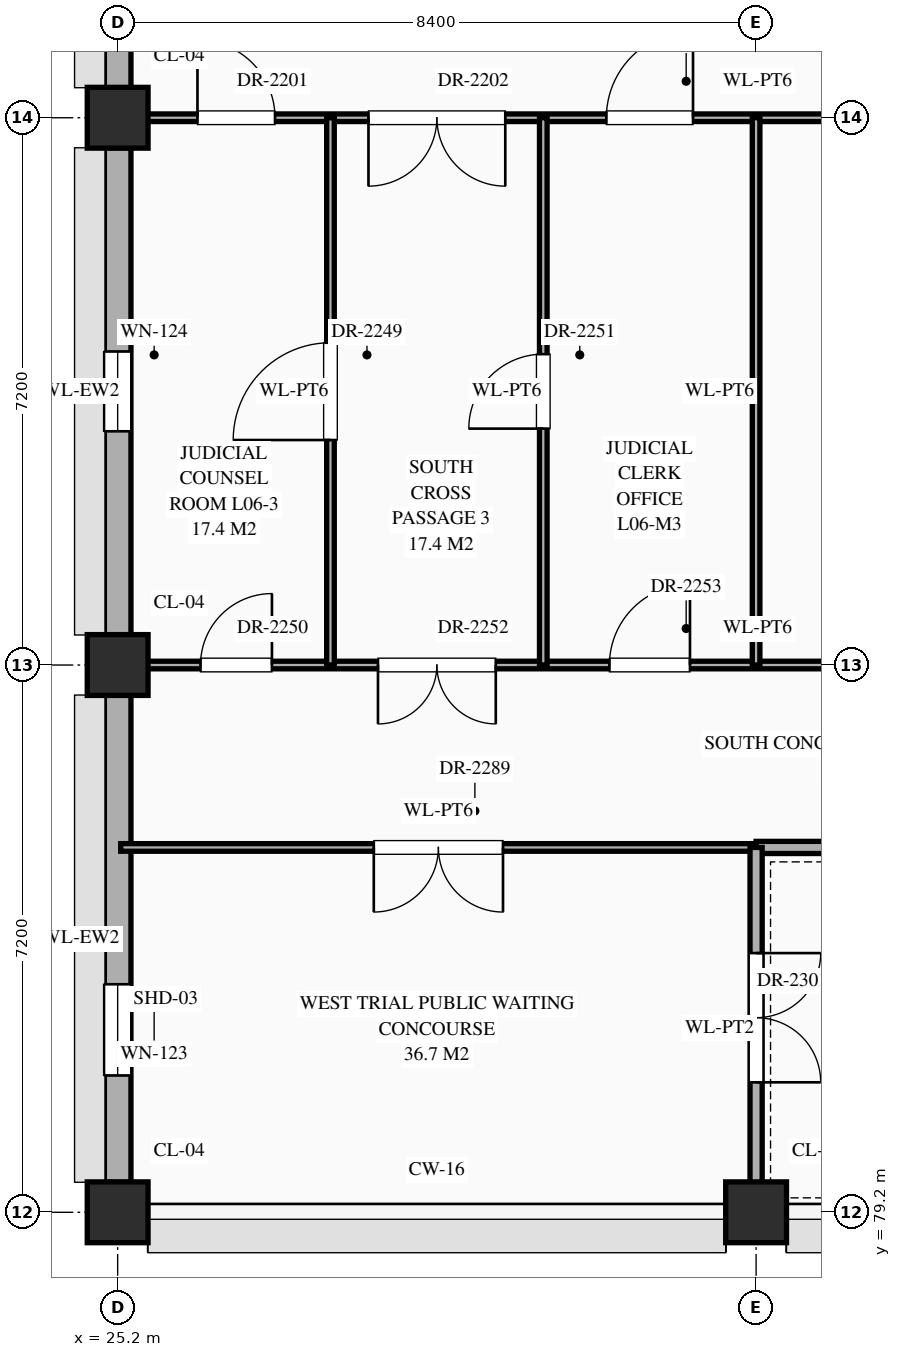
"""IFC4 building model, lengths in metres.
Left out: names, types, materials, properties, quantities, classifications, styles, units other than length and angle.
Written with IfcOpenShell. Run it as: python <this file> out.ifc"""

import sys

from ifc_helpers import new_model, si_unit, direction, frame, frame_2d, origin, origin_2d, place, context, subcontext, project, spatial, rectangle, extrude, element, fill, save


model = new_model("IFC4")
c1 = context("Model", 3, precision=1e-05, world=origin(), true_north=direction((0.0, 1.0)))
c2 = subcontext(c1, "Body", "Model", "MODEL_VIEW")
j1 = project(units=[si_unit("LENGTHUNIT", "METRE"), si_unit("PLANEANGLEUNIT", "RADIAN")], contexts=[c1])
p1 = place(None, origin())
s1 = spatial("IfcSite", under=j1, at=p1, CompositionType="ELEMENT")
p2 = place(p1, origin())
s2 = spatial("IfcBuilding", under=s1, at=p2, CompositionType="ELEMENT")
p3 = place(p2, frame((0.0, 0.0, 26.1)))
s3 = spatial("IfcBuildingStorey", under=s2, at=p3, CompositionType="ELEMENT", Elevation=26.1)
for number, where, z_axis, x_axis in (
    (1, (25.2, 79.2, 0.0), (0.0, 0.0, 1.0), (1.0, 0.0, 0.0)),
    (2, (25.2, 86.4, 0.0), (0.0, 0.0, 1.0), (1.0, 0.0, 0.0)),
    (3, (25.2, 93.6, 0.0), (0.0, 0.0, 1.0), (1.0, 0.0, 0.0)),
    (4, (33.6, 79.2, 0.0), (0.0, 0.0, 1.0), (1.0, 0.0, 0.0)),
):
    element("IfcColumn", number, at=place(p3, frame(where, z_axis=z_axis, x_axis=x_axis)), inside=s3, PredefinedType="COLUMN", context=c2, shape_type="SweptSolid", body=[
        extrude(rectangle(XDim=0.8, YDim=0.8, at=origin_2d()), origin(), (0.0, 0.0, 1.0), 4.5),
    ])
p4 = place(p3, frame((25.2, 79.595, 0.0), z_axis=(0.0, 0.0, 1.0), x_axis=(0.0, 1.0, 0.0)))
e5 = element("IfcWall", 5, at=p4, inside=s3, PredefinedType="STANDARD", context=c2, shape_type="SweptSolid", body=[
    extrude(rectangle(XDim=6.41, YDim=0.35, at=frame_2d((3.205, 0.0))), origin(), (0.0, 0.0, 1.0), 3.59),
])
p5 = place(p4, frame((1.405, 0.0, 0.85)))
e6 = element("IfcOpeningElement", 6, at=p5, cuts=e5, PredefinedType="OPENING", context=c2, shape_type="SweptSolid", body=[
    extrude(rectangle(XDim=1.2, YDim=1.2, at=frame_2d((0.6, 0.6))), frame((0.0, 0.187, 0.0), z_axis=(0.0, -1.0, 0.0), x_axis=(1.0, 0.0, 0.0)), (0.0, 0.0, 1.0), 0.374),
])
p6 = place(p3, frame((25.2, 86.795, 0.0), z_axis=(0.0, 0.0, 1.0), x_axis=(0.0, 1.0, 0.0)))
e7 = element("IfcWall", 7, at=p6, inside=s3, PredefinedType="STANDARD", context=c2, shape_type="SweptSolid", body=[
    extrude(rectangle(XDim=6.41, YDim=0.35, at=frame_2d((3.205, 0.0))), origin(), (0.0, 0.0, 1.0), 3.59),
])
p7 = place(p6, frame((2.68, 0.0, 0.85)))
e8 = element("IfcOpeningElement", 8, at=p7, cuts=e7, PredefinedType="OPENING", context=c2, shape_type="SweptSolid", body=[
    extrude(rectangle(XDim=1.05, YDim=1.38, at=frame_2d((0.525, 0.69))), frame((0.0, 0.187, 0.0), z_axis=(0.0, -1.0, 0.0), x_axis=(1.0, 0.0, 0.0)), (0.0, 0.0, 1.0), 0.374),
])
p8 = place(p3, frame((25.2, 93.995, 0.0), z_axis=(0.0, 0.0, 1.0), x_axis=(0.0, 1.0, 0.0)))
e9 = element("IfcWall", 9, at=p8, inside=s3, PredefinedType="STANDARD", context=c2, shape_type="SweptSolid", body=[
    extrude(rectangle(XDim=6.41, YDim=0.35, at=frame_2d((3.205, 0.0))), origin(), (0.0, 0.0, 1.0), 3.59),
])
p9 = place(p8, frame((3.83, 0.0, 0.85)))
e10 = element("IfcOpeningElement", 10, at=p9, cuts=e9, PredefinedType="OPENING", context=c2, shape_type="SweptSolid", body=[
    extrude(rectangle(XDim=1.35, YDim=1.56, at=frame_2d((0.675, 0.78))), frame((0.0, 0.187, 0.0), z_axis=(0.0, -1.0, 0.0), x_axis=(1.0, 0.0, 0.0)), (0.0, 0.0, 1.0), 0.374),
])
p10 = place(p3, frame((25.24, 84.0, 0.0), z_axis=(0.0, 0.0, 1.0), x_axis=(1.0, 0.0, 0.0)))
e11 = element("IfcWall", 11, at=p10, inside=s3, PredefinedType="STANDARD", context=c2, shape_type="SweptSolid", body=[
    extrude(rectangle(XDim=8.36, YDim=0.1, at=frame_2d((4.18, 0.0))), origin(), (0.0, 0.0, 1.0), 4.24),
])
p11 = place(p10, frame((3.33, 0.0, 0.0)))
e12 = element("IfcOpeningElement", 12, at=p11, cuts=e11, PredefinedType="OPENING", context=c2, shape_type="SweptSolid", body=[
    extrude(rectangle(XDim=1.7, YDim=2.45, at=frame_2d((0.85, 1.225))), frame((0.0, 0.062, 0.0), z_axis=(0.0, -1.0, 0.0), x_axis=(1.0, 0.0, 0.0)), (0.0, 0.0, 1.0), 0.124),
])
p12 = place(p3, frame((33.6, 84.0, 0.0), z_axis=(0.0, 0.0, 1.0), x_axis=(1.0, 0.0, 0.0)))
e13 = element("IfcWall", 13, at=p12, inside=s3, PredefinedType="STANDARD", context=c2, shape_type="SweptSolid", body=[
    extrude(rectangle(XDim=16.8, YDim=0.16, at=frame_2d((8.4, 0.0))), origin(), (0.0, 0.0, 1.0), 4.24),
])
p13 = place(p12, frame((7.675, 0.0, 0.0)))
e14 = element("IfcOpeningElement", 14, at=p13, cuts=e13, PredefinedType="OPENING", context=c2, shape_type="SweptSolid", body=[
    extrude(rectangle(XDim=1.45, YDim=2.3, at=frame_2d((0.725, 1.15))), frame((0.0, 0.092, 0.0), z_axis=(0.0, -1.0, 0.0), x_axis=(1.0, 0.0, 0.0)), (0.0, 0.0, 1.0), 0.184),
])
p14 = place(p3, frame((25.24, 86.4, 0.0), z_axis=(0.0, 0.0, 1.0), x_axis=(1.0, 0.0, 0.0)))
e15 = element("IfcWall", 15, at=p14, inside=s3, PredefinedType="STANDARD", context=c2, shape_type="SweptSolid", body=[
    extrude(rectangle(XDim=16.76, YDim=0.1, at=frame_2d((8.38, 0.0))), origin(), (0.0, 0.0, 1.0), 3.19),
])
p15 = place(p14, frame((1.05, 0.0, 0.0)))
e16 = element("IfcOpeningElement", 16, at=p15, cuts=e15, PredefinedType="OPENING", context=c2, shape_type="SweptSolid", body=[
    extrude(rectangle(XDim=0.94, YDim=2.3, at=frame_2d((0.47, 1.15))), frame((0.0, 0.062, 0.0), z_axis=(0.0, -1.0, 0.0), x_axis=(1.0, 0.0, 0.0)), (0.0, 0.0, 1.0), 0.124),
])
p16 = place(p14, frame((3.385, 0.0, 0.0)))
e17 = element("IfcOpeningElement", 17, at=p16, cuts=e15, PredefinedType="OPENING", context=c2, shape_type="SweptSolid", body=[
    extrude(rectangle(XDim=1.55, YDim=2.35, at=frame_2d((0.775, 1.175))), frame((0.0, 0.062, 0.0), z_axis=(0.0, -1.0, 0.0), x_axis=(1.0, 0.0, 0.0)), (0.0, 0.0, 1.0), 0.124),
])
p17 = place(p14, frame((6.43, 0.0, 0.0)))
e18 = element("IfcOpeningElement", 18, at=p17, cuts=e15, PredefinedType="OPENING", context=c2, shape_type="SweptSolid", body=[
    extrude(rectangle(XDim=1.06, YDim=2.4, at=frame_2d((0.53, 1.2))), frame((0.0, 0.062, 0.0), z_axis=(0.0, -1.0, 0.0), x_axis=(1.0, 0.0, 0.0)), (0.0, 0.0, 1.0), 0.124),
])
p18 = place(p14, frame((11.83, 0.0, 0.0)))
e19 = element("IfcOpeningElement", 19, at=p18, cuts=e15, PredefinedType="OPENING", context=c2, shape_type="SweptSolid", body=[
    extrude(rectangle(XDim=1.14, YDim=2.4, at=frame_2d((0.57, 1.2))), frame((0.0, 0.062, 0.0), z_axis=(0.0, -1.0, 0.0), x_axis=(1.0, 0.0, 0.0)), (0.0, 0.0, 1.0), 0.124),
])
p19 = place(p3, frame((25.24, 93.6, 0.0), z_axis=(0.0, 0.0, 1.0), x_axis=(1.0, 0.0, 0.0)))
e20 = element("IfcWall", 20, at=p19, inside=s3, PredefinedType="STANDARD", context=c2, shape_type="SweptSolid", body=[
    extrude(rectangle(XDim=16.76, YDim=0.1, at=frame_2d((8.38, 0.0))), origin(), (0.0, 0.0, 1.0), 3.19),
])
p20 = place(p19, frame((1.01, 0.0, 0.0)))
e21 = element("IfcOpeningElement", 21, at=p20, cuts=e20, PredefinedType="OPENING", context=c2, shape_type="SweptSolid", body=[
    extrude(rectangle(XDim=1.02, YDim=2.4, at=frame_2d((0.51, 1.2))), frame((0.0, 0.062, 0.0), z_axis=(0.0, -1.0, 0.0), x_axis=(1.0, 0.0, 0.0)), (0.0, 0.0, 1.0), 0.124),
])
p21 = place(p19, frame((3.26, 0.0, 0.0)))
e22 = element("IfcOpeningElement", 22, at=p21, cuts=e20, PredefinedType="OPENING", context=c2, shape_type="SweptSolid", body=[
    extrude(rectangle(XDim=1.8, YDim=2.5, at=frame_2d((0.9, 1.25))), frame((0.0, 0.062, 0.0), z_axis=(0.0, -1.0, 0.0), x_axis=(1.0, 0.0, 0.0)), (0.0, 0.0, 1.0), 0.124),
])
p22 = place(p19, frame((6.39, 0.0, 0.0)))
e23 = element("IfcOpeningElement", 23, at=p22, cuts=e20, PredefinedType="OPENING", context=c2, shape_type="SweptSolid", body=[
    extrude(rectangle(XDim=1.14, YDim=2.4, at=frame_2d((0.57, 1.2))), frame((0.0, 0.062, 0.0), z_axis=(0.0, -1.0, 0.0), x_axis=(1.0, 0.0, 0.0)), (0.0, 0.0, 1.0), 0.124),
])
p23 = place(p19, frame((11.95, 0.0, 0.0)))
e24 = element("IfcOpeningElement", 24, at=p23, cuts=e20, PredefinedType="OPENING", context=c2, shape_type="SweptSolid", body=[
    extrude(rectangle(XDim=0.9, YDim=2.15, at=frame_2d((0.45, 1.075))), frame((0.0, 0.062, 0.0), z_axis=(0.0, -1.0, 0.0), x_axis=(1.0, 0.0, 0.0)), (0.0, 0.0, 1.0), 0.124),
])
p24 = place(p3, frame((28.0, 86.4, 0.0), z_axis=(0.0, 0.0, 1.0), x_axis=(0.0, 1.0, 0.0)))
e25 = element("IfcWall", 25, at=p24, inside=s3, PredefinedType="STANDARD", context=c2, shape_type="SweptSolid", body=[
    extrude(rectangle(XDim=7.2, YDim=0.1, at=frame_2d((3.6, 0.0))), origin(), (0.0, 0.0, 1.0), 4.24),
])
p25 = place(p24, frame((2.96, 0.0, 0.0)))
e26 = element("IfcOpeningElement", 26, at=p25, cuts=e25, PredefinedType="OPENING", context=c2, shape_type="SweptSolid", body=[
    extrude(rectangle(XDim=1.28, YDim=2.35, at=frame_2d((0.64, 1.175))), frame((0.0, 0.062, 0.0), z_axis=(0.0, -1.0, 0.0), x_axis=(1.0, 0.0, 0.0)), (0.0, 0.0, 1.0), 0.124),
])
p26 = place(p3, frame((30.8, 86.4, 0.0), z_axis=(0.0, 0.0, 1.0), x_axis=(0.0, 1.0, 0.0)))
e27 = element("IfcWall", 27, at=p26, inside=s3, PredefinedType="STANDARD", context=c2, shape_type="SweptSolid", body=[
    extrude(rectangle(XDim=7.2, YDim=0.1, at=frame_2d((3.6, 0.0))), origin(), (0.0, 0.0, 1.0), 4.24),
])
p27 = place(p26, frame((3.11, 0.0, 0.0)))
e28 = element("IfcOpeningElement", 28, at=p27, cuts=e27, PredefinedType="OPENING", context=c2, shape_type="SweptSolid", body=[
    extrude(rectangle(XDim=0.98, YDim=2.35, at=frame_2d((0.49, 1.175))), frame((0.0, 0.062, 0.0), z_axis=(0.0, -1.0, 0.0), x_axis=(1.0, 0.0, 0.0)), (0.0, 0.0, 1.0), 0.124),
])
p28 = place(p3, frame((33.6, 79.24, 0.0), z_axis=(0.0, 0.0, 1.0), x_axis=(0.0, 1.0, 0.0)))
e29 = element("IfcWall", 29, at=p28, inside=s3, PredefinedType="STANDARD", context=c2, shape_type="SweptSolid", body=[
    extrude(rectangle(XDim=4.76, YDim=0.16, at=frame_2d((2.38, 0.0))), origin(), (0.0, 0.0, 1.0), 4.24),
])
p29 = place(p28, frame((1.67, 0.0, 0.0)))
e30 = element("IfcOpeningElement", 30, at=p29, cuts=e29, PredefinedType="OPENING", context=c2, shape_type="SweptSolid", body=[
    extrude(rectangle(XDim=1.7, YDim=2.45, at=frame_2d((0.85, 1.225))), frame((0.0, 0.092, 0.0), z_axis=(0.0, -1.0, 0.0), x_axis=(1.0, 0.0, 0.0)), (0.0, 0.0, 1.0), 0.184),
])
p30 = place(p3, frame((33.6, 86.4, 0.0), z_axis=(0.0, 0.0, 1.0), x_axis=(0.0, 1.0, 0.0)))
e31 = element("IfcWall", 31, at=p30, inside=s3, PredefinedType="STANDARD", context=c2, shape_type="SweptSolid", body=[
    extrude(rectangle(XDim=7.2, YDim=0.1, at=frame_2d((3.6, 0.0))), origin(), (0.0, 0.0, 1.0), 4.24),
])
p31 = place(p5, origin())
e32 = element("IfcWindow", 32, at=p31, inside=s3, PartitioningType="SINGLE_PANEL", PredefinedType="WINDOW", context=c2, shape_type="SweptSolid", body=[
    extrude(rectangle(XDim=1.2, YDim=1.2, at=frame_2d((0.6, 0.6))), frame((0.0, 0.03, 0.0), z_axis=(0.0, -1.0, 0.0), x_axis=(1.0, 0.0, 0.0)), (0.0, 0.0, 1.0), 0.06),
])
fill(e6, e32)
p32 = place(p7, origin())
e33 = element("IfcWindow", 33, at=p32, inside=s3, PartitioningType="SINGLE_PANEL", PredefinedType="WINDOW", context=c2, shape_type="SweptSolid", body=[
    extrude(rectangle(XDim=1.05, YDim=1.38, at=frame_2d((0.525, 0.69))), frame((0.0, 0.03, 0.0), z_axis=(0.0, -1.0, 0.0), x_axis=(1.0, 0.0, 0.0)), (0.0, 0.0, 1.0), 0.06),
])
fill(e8, e33)
p33 = place(p20, origin())
e34 = element("IfcDoor", 34, at=p33, inside=s3, OperationType="SINGLE_SWING_LEFT", PredefinedType="DOOR", context=c2, shape_type="SweptSolid", body=[
    extrude(rectangle(XDim=1.02, YDim=2.4, at=frame_2d((0.51, 1.2))), frame((0.0, 0.025, 0.0), z_axis=(0.0, -1.0, 0.0), x_axis=(1.0, 0.0, 0.0)), (0.0, 0.0, 1.0), 0.05),
])
fill(e21, e34)
p34 = place(p21, frame((1.8, 0.0, 0.0), z_axis=(0.0, 0.0, 1.0), x_axis=(-1.0, 0.0, 0.0)))
e35 = element("IfcDoor", 35, at=p34, inside=s3, OperationType="DOUBLE_DOOR_SINGLE_SWING", PredefinedType="DOOR", context=c2, shape_type="SweptSolid", body=[
    extrude(rectangle(XDim=1.8, YDim=2.5, at=frame_2d((0.9, 1.25))), frame((0.0, 0.025, 0.0), z_axis=(0.0, -1.0, 0.0), x_axis=(1.0, 0.0, 0.0)), (0.0, 0.0, 1.0), 0.05),
])
fill(e22, e35)
p35 = place(p22, origin())
e36 = element("IfcDoor", 36, at=p35, inside=s3, OperationType="SINGLE_SWING_RIGHT", PredefinedType="DOOR", context=c2, shape_type="SweptSolid", body=[
    extrude(rectangle(XDim=1.14, YDim=2.4, at=frame_2d((0.57, 1.2))), frame((0.0, 0.025, 0.0), z_axis=(0.0, -1.0, 0.0), x_axis=(1.0, 0.0, 0.0)), (0.0, 0.0, 1.0), 0.05),
])
fill(e23, e36)
p36 = place(p25, origin())
e37 = element("IfcDoor", 37, at=p36, inside=s3, OperationType="SINGLE_SWING_LEFT", PredefinedType="DOOR", context=c2, shape_type="SweptSolid", body=[
    extrude(rectangle(XDim=1.28, YDim=2.35, at=frame_2d((0.64, 1.175))), frame((0.0, 0.025, 0.0), z_axis=(0.0, -1.0, 0.0), x_axis=(1.0, 0.0, 0.0)), (0.0, 0.0, 1.0), 0.05),
])
fill(e26, e37)
p37 = place(p15, origin())
e38 = element("IfcDoor", 38, at=p37, inside=s3, OperationType="SINGLE_SWING_RIGHT", PredefinedType="DOOR", context=c2, shape_type="SweptSolid", body=[
    extrude(rectangle(XDim=0.94, YDim=2.3, at=frame_2d((0.47, 1.15))), frame((0.0, 0.025, 0.0), z_axis=(0.0, -1.0, 0.0), x_axis=(1.0, 0.0, 0.0)), (0.0, 0.0, 1.0), 0.05),
])
fill(e16, e38)
p38 = place(p27, origin())
e39 = element("IfcDoor", 39, at=p38, inside=s3, OperationType="SINGLE_SWING_LEFT", PredefinedType="DOOR", context=c2, shape_type="SweptSolid", body=[
    extrude(rectangle(XDim=0.98, YDim=2.35, at=frame_2d((0.49, 1.175))), frame((0.0, 0.025, 0.0), z_axis=(0.0, -1.0, 0.0), x_axis=(1.0, 0.0, 0.0)), (0.0, 0.0, 1.0), 0.05),
])
fill(e28, e39)
p39 = place(p16, frame((1.55, 0.0, 0.0), z_axis=(0.0, 0.0, 1.0), x_axis=(-1.0, 0.0, 0.0)))
e40 = element("IfcDoor", 40, at=p39, inside=s3, OperationType="DOUBLE_DOOR_SINGLE_SWING", PredefinedType="DOOR", context=c2, shape_type="SweptSolid", body=[
    extrude(rectangle(XDim=1.55, YDim=2.35, at=frame_2d((0.775, 1.175))), frame((0.0, 0.025, 0.0), z_axis=(0.0, -1.0, 0.0), x_axis=(1.0, 0.0, 0.0)), (0.0, 0.0, 1.0), 0.05),
])
fill(e17, e40)
p40 = place(p17, origin())
e41 = element("IfcDoor", 41, at=p40, inside=s3, OperationType="SINGLE_SWING_RIGHT", PredefinedType="DOOR", context=c2, shape_type="SweptSolid", body=[
    extrude(rectangle(XDim=1.06, YDim=2.4, at=frame_2d((0.53, 1.2))), frame((0.0, 0.025, 0.0), z_axis=(0.0, -1.0, 0.0), x_axis=(1.0, 0.0, 0.0)), (0.0, 0.0, 1.0), 0.05),
])
fill(e18, e41)
p41 = place(p11, frame((1.7, 0.0, 0.0), z_axis=(0.0, 0.0, 1.0), x_axis=(-1.0, 0.0, 0.0)))
e42 = element("IfcDoor", 42, at=p41, inside=s3, OperationType="DOUBLE_DOOR_SINGLE_SWING", PredefinedType="DOOR", context=c2, shape_type="SweptSolid", body=[
    extrude(rectangle(XDim=1.7, YDim=2.45, at=frame_2d((0.85, 1.225))), frame((0.0, 0.025, 0.0), z_axis=(0.0, -1.0, 0.0), x_axis=(1.0, 0.0, 0.0)), (0.0, 0.0, 1.0), 0.05),
])
fill(e12, e42)
p42 = place(p29, frame((1.7, 0.0, 0.0), z_axis=(0.0, 0.0, 1.0), x_axis=(-1.0, 0.0, 0.0)))
e43 = element("IfcDoor", 43, at=p42, inside=s3, OperationType="DOUBLE_DOOR_SINGLE_SWING", PredefinedType="DOOR", context=c2, shape_type="SweptSolid", body=[
    extrude(rectangle(XDim=1.7, YDim=2.45, at=frame_2d((0.85, 1.225))), frame((0.0, 0.025, 0.0), z_axis=(0.0, -1.0, 0.0), x_axis=(1.0, 0.0, 0.0)), (0.0, 0.0, 1.0), 0.05),
])
fill(e30, e43)
save(model, sys.argv[1])
